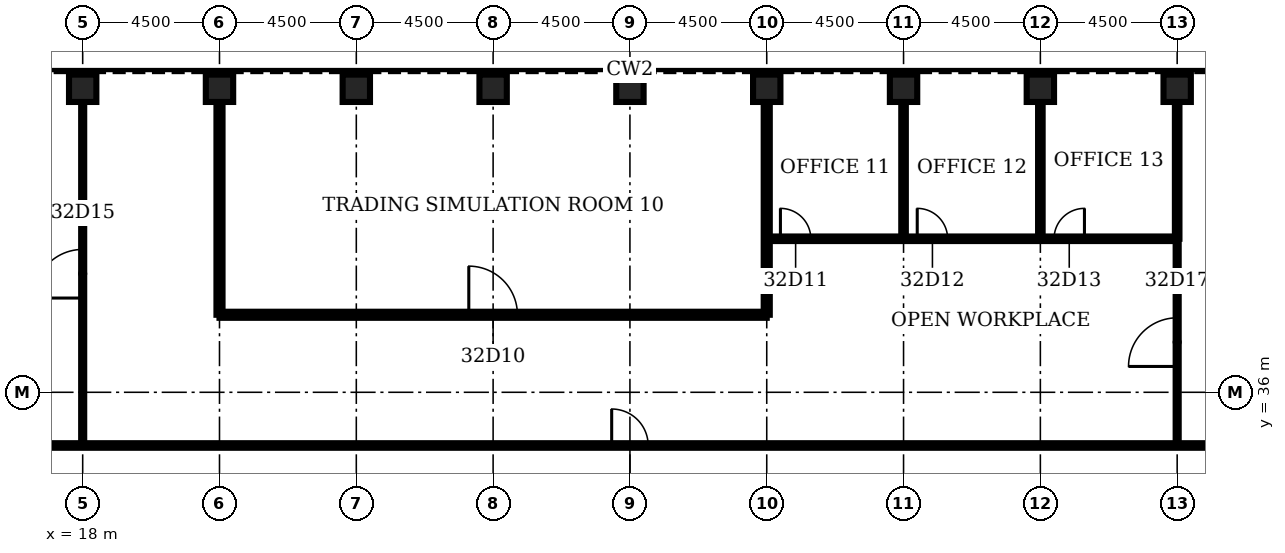
"""IFC4 building model, lengths in metres.
Left out: names, types, materials, properties, quantities, classifications, styles, units other than length and angle.
Written with IfcOpenShell. Run it as: python <this file> out.ifc"""

import sys

from ifc_helpers import new_model, si_unit, direction, frame, frame_2d, origin, origin_2d, place, context, subcontext, project, spatial, rectangle, hollow_rectangle, extrude, element, fill, save


model = new_model("IFC4")
c1 = context("Model", 3, precision=1e-05, world=origin(), true_north=direction((0.0, 1.0)))
c2 = subcontext(c1, "Body", "Model", "MODEL_VIEW")
j1 = project(units=[si_unit("LENGTHUNIT", "METRE"), si_unit("PLANEANGLEUNIT", "RADIAN")], contexts=[c1])
p1 = place(None, origin())
s1 = spatial("IfcSite", under=j1, at=p1, CompositionType="ELEMENT")
p2 = place(p1, origin())
s2 = spatial("IfcBuilding", under=s1, at=p2, CompositionType="ELEMENT")
p3 = place(p2, frame((0.0, 0.0, 146.7)))
s3 = spatial("IfcBuildingStorey", under=s2, at=p3, CompositionType="ELEMENT", Elevation=146.7)
for number, where, z_axis, x_axis in (
    (1, (54.0, 46.0, 0.0), (0.0, 0.0, 1.0), (0.0, 1.0, 0.0)),
    (2, (49.5, 46.0, 0.0), (0.0, 0.0, 1.0), (0.0, 1.0, 0.0)),
    (3, (45.0, 46.0, 0.0), (0.0, 0.0, 1.0), (0.0, 1.0, 0.0)),
    (4, (40.5, 46.0, 0.0), (0.0, 0.0, 1.0), (0.0, 1.0, 0.0)),
    (5, (36.0, 46.0, 0.0), (0.0, 0.0, 1.0), (0.0, 1.0, 0.0)),
    (6, (31.5, 46.0, 0.0), (0.0, 0.0, 1.0), (0.0, 1.0, 0.0)),
    (7, (27.0, 46.0, 0.0), (0.0, 0.0, 1.0), (0.0, 1.0, 0.0)),
    (8, (22.5, 46.0, 0.0), (0.0, 0.0, 1.0), (0.0, 1.0, 0.0)),
    (9, (18.0, 46.0, 0.0), (0.0, 0.0, 1.0), (0.0, 1.0, 0.0)),
):
    element("IfcColumn", number, at=place(p3, frame(where, z_axis=z_axis, x_axis=x_axis)), inside=s3, PredefinedType="COLUMN", context=c2, shape_type="SweptSolid", body=[
        extrude(hollow_rectangle(XDim=0.9, YDim=0.9, WallThickness=0.1, at=origin_2d()), origin(), (0.0, 0.0, 1.0), 4.2),
    ])
p4 = place(p3, frame((15.15, 34.25, 0.0), z_axis=(0.0, 0.0, 1.0), x_axis=(1.0, 0.0, 0.0)))
e10 = element("IfcWall", 10, at=p4, inside=s3, PredefinedType="PARTITIONING", context=c2, shape_type="SweptSolid", body=[
    extrude(rectangle(XDim=41.7, YDim=0.15, at=frame_2d((20.85, 0.0))), origin(), (0.0, 0.0, 1.0), 3.0),
])
p5 = place(p4, frame((20.25, 0.0, 0.0)))
e11 = element("IfcOpeningElement", 11, at=p5, cuts=e10, PredefinedType="OPENING", context=c2, shape_type="SweptSolid", body=[
    extrude(rectangle(XDim=1.2, YDim=2.1, at=frame_2d((0.6, 1.05))), frame((0.0, 0.085, 0.0), z_axis=(0.0, -1.0, 0.0), x_axis=(1.0, 0.0, 0.0)), (0.0, 0.0, 1.0), 0.17),
])
p6 = place(p3, frame((22.5, 38.55, 0.0), z_axis=(0.0, 0.0, 1.0), x_axis=(1.0, 0.0, 0.0)))
e12 = element("IfcWall", 12, at=p6, inside=s3, PredefinedType="PARTITIONING", context=c2, shape_type="SweptSolid", body=[
    extrude(rectangle(XDim=18.0, YDim=0.2, at=frame_2d((9.0, 0.0))), origin(), (0.0, 0.0, 1.0), 3.0),
])
p7 = place(p6, frame((8.2, 0.0, 0.0)))
e13 = element("IfcOpeningElement", 13, at=p7, cuts=e12, PredefinedType="OPENING", context=c2, shape_type="SweptSolid", body=[
    extrude(rectangle(XDim=1.6, YDim=2.1, at=frame_2d((0.8, 1.05))), frame((0.0, 0.11, 0.0), z_axis=(0.0, -1.0, 0.0), x_axis=(1.0, 0.0, 0.0)), (0.0, 0.0, 1.0), 0.22),
])
p8 = place(p3, frame((40.5, 41.05, 0.0), z_axis=(0.0, 0.0, 1.0), x_axis=(1.0, 0.0, 0.0)))
e14 = element("IfcWall", 14, at=p8, inside=s3, PredefinedType="PARTITIONING", context=c2, shape_type="SweptSolid", body=[
    extrude(rectangle(XDim=13.5, YDim=0.15, at=frame_2d((6.75, 0.0))), origin(), (0.0, 0.0, 1.0), 3.0),
])
p9 = place(p8, frame((0.45, 0.0, 0.0)))
e15 = element("IfcOpeningElement", 15, at=p9, cuts=e14, PredefinedType="OPENING", context=c2, shape_type="SweptSolid", body=[
    extrude(rectangle(XDim=1.0, YDim=2.1, at=frame_2d((0.5, 1.05))), frame((0.0, 0.085, 0.0), z_axis=(0.0, -1.0, 0.0), x_axis=(1.0, 0.0, 0.0)), (0.0, 0.0, 1.0), 0.17),
])
p10 = place(p8, frame((4.95, 0.0, 0.0)))
e16 = element("IfcOpeningElement", 16, at=p10, cuts=e14, PredefinedType="OPENING", context=c2, shape_type="SweptSolid", body=[
    extrude(rectangle(XDim=1.0, YDim=2.1, at=frame_2d((0.5, 1.05))), frame((0.0, 0.085, 0.0), z_axis=(0.0, -1.0, 0.0), x_axis=(1.0, 0.0, 0.0)), (0.0, 0.0, 1.0), 0.17),
])
p11 = place(p8, frame((9.45, 0.0, 0.0)))
e17 = element("IfcOpeningElement", 17, at=p11, cuts=e14, PredefinedType="OPENING", context=c2, shape_type="SweptSolid", body=[
    extrude(rectangle(XDim=1.0, YDim=2.1, at=frame_2d((0.5, 1.05))), frame((0.0, 0.085, 0.0), z_axis=(0.0, -1.0, 0.0), x_axis=(1.0, 0.0, 0.0)), (0.0, 0.0, 1.0), 0.17),
])
p12 = place(p3, frame((18.0, 34.25, 0.0), z_axis=(0.0, 0.0, 1.0), x_axis=(0.0, 1.0, 0.0)))
e18 = element("IfcWall", 18, at=p12, inside=s3, PredefinedType="PARTITIONING", context=c2, shape_type="SweptSolid", body=[
    extrude(rectangle(XDim=11.3, YDim=0.1, at=frame_2d((5.65, 0.0))), origin(), (0.0, 0.0, 1.0), 3.0),
])
p13 = place(p12, frame((4.85, 0.0, 0.0)))
e19 = element("IfcOpeningElement", 19, at=p13, cuts=e18, PredefinedType="OPENING", context=c2, shape_type="SweptSolid", body=[
    extrude(rectangle(XDim=1.6, YDim=2.1, at=frame_2d((0.8, 1.05))), frame((0.0, 0.06, 0.0), z_axis=(0.0, -1.0, 0.0), x_axis=(1.0, 0.0, 0.0)), (0.0, 0.0, 1.0), 0.12),
])
for number, where, z_axis, x_axis in (
    (20, (22.5, 38.55, 0.0), (0.0, 0.0, 1.0), (0.0, 1.0, 0.0)),
    (21, (40.5, 38.55, 0.0), (0.0, 0.0, 1.0), (0.0, 1.0, 0.0)),
):
    element("IfcWall", number, at=place(p3, frame(where, z_axis=z_axis, x_axis=x_axis)), inside=s3, PredefinedType="PARTITIONING", context=c2, shape_type="SweptSolid", body=[
        extrude(rectangle(XDim=7.0, YDim=0.2, at=frame_2d((3.5, 0.0))), origin(), (0.0, 0.0, 1.0), 3.0),
    ])
for number, where, z_axis, x_axis in (
    (22, (45.0, 41.05, 0.0), (0.0, 0.0, 1.0), (0.0, 1.0, 0.0)),
    (23, (49.5, 41.05, 0.0), (0.0, 0.0, 1.0), (0.0, 1.0, 0.0)),
):
    element("IfcWall", number, at=place(p3, frame(where, z_axis=z_axis, x_axis=x_axis)), inside=s3, PredefinedType="PARTITIONING", context=c2, shape_type="SweptSolid", body=[
        extrude(rectangle(XDim=4.5, YDim=0.15, at=frame_2d((2.25, 0.0))), origin(), (0.0, 0.0, 1.0), 3.0),
    ])
p14 = place(p3, frame((54.0, 34.25, 0.0), z_axis=(0.0, 0.0, 1.0), x_axis=(0.0, 1.0, 0.0)))
e24 = element("IfcWall", 24, at=p14, inside=s3, PredefinedType="PARTITIONING", context=c2, shape_type="SweptSolid", body=[
    extrude(rectangle(XDim=6.8, YDim=0.1, at=frame_2d((3.4, 0.0))), origin(), (0.0, 0.0, 1.0), 3.0),
])
p15 = place(p14, frame((2.6, 0.0, 0.0)))
e25 = element("IfcOpeningElement", 25, at=p15, cuts=e24, PredefinedType="OPENING", context=c2, shape_type="SweptSolid", body=[
    extrude(rectangle(XDim=1.6, YDim=2.1, at=frame_2d((0.8, 1.05))), frame((0.0, 0.06, 0.0), z_axis=(0.0, -1.0, 0.0), x_axis=(1.0, 0.0, 0.0)), (0.0, 0.0, 1.0), 0.12),
])
p16 = place(p3, frame((54.0, 41.05, 0.0), z_axis=(0.0, 0.0, 1.0), x_axis=(0.0, 1.0, 0.0)))
e26 = element("IfcWall", 26, at=p16, inside=s3, PredefinedType="PARTITIONING", context=c2, shape_type="SweptSolid", body=[
    extrude(rectangle(XDim=4.5, YDim=0.15, at=frame_2d((2.25, 0.0))), origin(), (0.0, 0.0, 1.0), 3.0),
])
p17 = place(p7, origin())
e27 = element("IfcDoor", 27, at=p17, inside=s3, OperationType="SINGLE_SWING_LEFT", PredefinedType="DOOR", context=c2, shape_type="SweptSolid", body=[
    extrude(rectangle(XDim=1.6, YDim=2.1, at=frame_2d((0.8, 1.05))), frame((0.0, 0.025, 0.0), z_axis=(0.0, -1.0, 0.0), x_axis=(1.0, 0.0, 0.0)), (0.0, 0.0, 1.0), 0.05),
])
fill(e13, e27)
p18 = place(p9, origin())
e28 = element("IfcDoor", 28, at=p18, inside=s3, OperationType="SINGLE_SWING_LEFT", PredefinedType="DOOR", context=c2, shape_type="SweptSolid", body=[
    extrude(rectangle(XDim=1.0, YDim=2.1, at=frame_2d((0.5, 1.05))), frame((0.0, 0.025, 0.0), z_axis=(0.0, -1.0, 0.0), x_axis=(1.0, 0.0, 0.0)), (0.0, 0.0, 1.0), 0.05),
])
fill(e15, e28)
p19 = place(p10, origin())
e29 = element("IfcDoor", 29, at=p19, inside=s3, OperationType="SINGLE_SWING_LEFT", PredefinedType="DOOR", context=c2, shape_type="SweptSolid", body=[
    extrude(rectangle(XDim=1.0, YDim=2.1, at=frame_2d((0.5, 1.05))), frame((0.0, 0.025, 0.0), z_axis=(0.0, -1.0, 0.0), x_axis=(1.0, 0.0, 0.0)), (0.0, 0.0, 1.0), 0.05),
])
fill(e16, e29)
p20 = place(p11, origin())
e30 = element("IfcDoor", 30, at=p20, inside=s3, OperationType="SINGLE_SWING_RIGHT", PredefinedType="DOOR", context=c2, shape_type="SweptSolid", body=[
    extrude(rectangle(XDim=1.0, YDim=2.1, at=frame_2d((0.5, 1.05))), frame((0.0, 0.025, 0.0), z_axis=(0.0, -1.0, 0.0), x_axis=(1.0, 0.0, 0.0)), (0.0, 0.0, 1.0), 0.05),
])
fill(e17, e30)
p21 = place(p13, origin())
e31 = element("IfcDoor", 31, at=p21, inside=s3, OperationType="SINGLE_SWING_LEFT", PredefinedType="DOOR", context=c2, shape_type="SweptSolid", body=[
    extrude(rectangle(XDim=1.6, YDim=2.1, at=frame_2d((0.8, 1.05))), frame((0.0, 0.025, 0.0), z_axis=(0.0, -1.0, 0.0), x_axis=(1.0, 0.0, 0.0)), (0.0, 0.0, 1.0), 0.05),
])
fill(e19, e31)
p22 = place(p15, origin())
e32 = element("IfcDoor", 32, at=p22, inside=s3, OperationType="SINGLE_SWING_LEFT", PredefinedType="DOOR", context=c2, shape_type="SweptSolid", body=[
    extrude(rectangle(XDim=1.6, YDim=2.1, at=frame_2d((0.8, 1.05))), frame((0.0, 0.025, 0.0), z_axis=(0.0, -1.0, 0.0), x_axis=(1.0, 0.0, 0.0)), (0.0, 0.0, 1.0), 0.05),
])
fill(e25, e32)
p23 = place(p5, origin())
e33 = element("IfcDoor", 33, at=p23, inside=s3, OperationType="SINGLE_SWING_LEFT", PredefinedType="DOOR", context=c2, shape_type="SweptSolid", body=[
    extrude(rectangle(XDim=1.2, YDim=2.1, at=frame_2d((0.6, 1.05))), frame((0.0, 0.025, 0.0), z_axis=(0.0, -1.0, 0.0), x_axis=(1.0, 0.0, 0.0)), (0.0, 0.0, 1.0), 0.05),
])
fill(e11, e33)
save(model, sys.argv[1])
